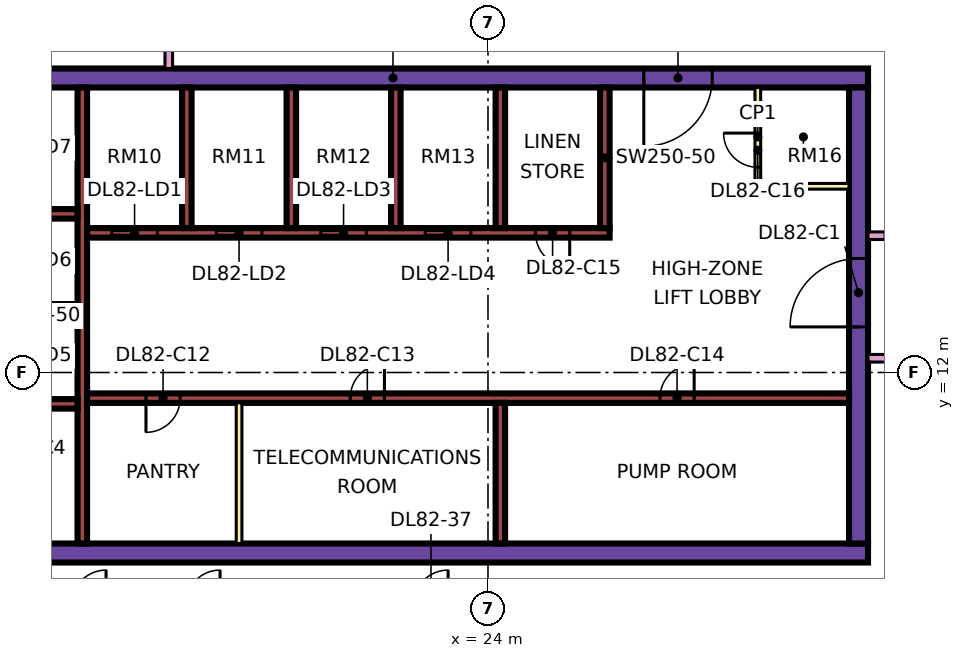
"""IFC4 building model, lengths in metres.
Left out: names, types, materials, properties, quantities, classifications, styles, units other than length and angle.
Written with IfcOpenShell. Run it as: python <this file> out.ifc"""

import sys

from ifc_helpers import new_model, si_unit, direction, frame, frame_2d, origin, place, context, subcontext, project, spatial, rectangle, extrude, element, fill, save


model = new_model("IFC4")
c1 = context("Model", 3, precision=1e-05, world=origin(), true_north=direction((0.0, 1.0)))
c2 = subcontext(c1, "Body", "Model", "MODEL_VIEW")
j1 = project(units=[si_unit("LENGTHUNIT", "METRE"), si_unit("PLANEANGLEUNIT", "RADIAN")], contexts=[c1])
p1 = place(None, origin())
s1 = spatial("IfcSite", under=j1, at=p1, CompositionType="ELEMENT")
p2 = place(p1, origin())
s2 = spatial("IfcBuilding", under=s1, at=p2, CompositionType="ELEMENT")
p3 = place(p2, frame((0.0, 0.0, 353.9)))
s3 = spatial("IfcBuildingStorey", under=s2, at=p3, CompositionType="ELEMENT", Elevation=353.9)
p4 = place(p3, frame((9.0, 7.25, 0.0), z_axis=(0.0, 0.0, 1.0), x_axis=(1.0, 0.0, 0.0)))
e1 = element("IfcWall", 1, at=p4, inside=s3, PredefinedType="SHEAR", context=c2, shape_type="SweptSolid", body=[
    extrude(rectangle(XDim=25.0, YDim=0.5, at=frame_2d((12.5, 0.0))), origin(), (0.0, 0.0, 1.0), 3.75),
])
p5 = place(p3, frame((9.0, 19.75, 0.0), z_axis=(0.0, 0.0, 1.0), x_axis=(1.0, 0.0, 0.0)))
e2 = element("IfcWall", 2, at=p5, inside=s3, PredefinedType="SHEAR", context=c2, shape_type="SweptSolid", body=[
    extrude(rectangle(XDim=25.0, YDim=0.5, at=frame_2d((12.5, 0.0))), origin(), (0.0, 0.0, 1.0), 3.75),
])
p6 = place(p5, frame((19.1, 0.0, 0.0)))
e3 = element("IfcOpeningElement", 3, at=p6, cuts=e2, PredefinedType="OPENING", context=c2, shape_type="SweptSolid", body=[
    extrude(rectangle(XDim=1.8, YDim=2.4, at=frame_2d((0.9, 1.2))), frame((0.0, 0.26, 0.0), z_axis=(0.0, -1.0, 0.0), x_axis=(1.0, 0.0, 0.0)), (0.0, 0.0, 1.0), 0.52),
])
p7 = place(p3, frame((33.75, 7.5, 0.0), z_axis=(0.0, 0.0, 1.0), x_axis=(0.0, 1.0, 0.0)))
e4 = element("IfcWall", 4, at=p7, inside=s3, PredefinedType="SHEAR", context=c2, shape_type="SweptSolid", body=[
    extrude(rectangle(XDim=12.0, YDim=0.5, at=frame_2d((6.0, 0.0))), origin(), (0.0, 0.0, 1.0), 3.75),
])
p8 = place(p7, frame((5.7, 0.0, 0.0)))
e5 = element("IfcOpeningElement", 5, at=p8, cuts=e4, PredefinedType="OPENING", context=c2, shape_type="SweptSolid", body=[
    extrude(rectangle(XDim=1.8, YDim=2.4, at=frame_2d((0.9, 1.2))), frame((0.0, 0.26, 0.0), z_axis=(0.0, -1.0, 0.0), x_axis=(1.0, 0.0, 0.0)), (0.0, 0.0, 1.0), 0.52),
])
p9 = place(p3, frame((13.325, 7.5, 0.0), z_axis=(0.0, 0.0, 1.0), x_axis=(0.0, 1.0, 0.0)))
e6 = element("IfcWall", 6, at=p9, inside=s3, PredefinedType="SHEAR", context=c2, shape_type="SweptSolid", body=[
    extrude(rectangle(XDim=12.0, YDim=0.25, at=frame_2d((6.0, 0.0))), origin(), (0.0, 0.0, 1.0), 3.75),
])
p10 = place(p3, frame((13.45, 11.325, 0.0), z_axis=(0.0, 0.0, 1.0), x_axis=(1.0, 0.0, 0.0)))
e7 = element("IfcWall", 7, at=p10, inside=s3, PredefinedType="SHEAR", context=c2, shape_type="SweptSolid", body=[
    extrude(rectangle(XDim=20.05, YDim=0.25, at=frame_2d((10.025, 0.0))), origin(), (0.0, 0.0, 1.0), 3.75),
])
p11 = place(p10, frame((1.55, 0.0, 0.0)))
e8 = element("IfcOpeningElement", 8, at=p11, cuts=e7, PredefinedType="OPENING", context=c2, shape_type="SweptSolid", body=[
    extrude(rectangle(XDim=0.9, YDim=2.1, at=frame_2d((0.45, 1.05))), frame((0.0, 0.135, 0.0), z_axis=(0.0, -1.0, 0.0), x_axis=(1.0, 0.0, 0.0)), (0.0, 0.0, 1.0), 0.27),
])
p12 = place(p10, frame((6.925, 0.0, 0.0)))
e9 = element("IfcOpeningElement", 9, at=p12, cuts=e7, PredefinedType="OPENING", context=c2, shape_type="SweptSolid", body=[
    extrude(rectangle(XDim=0.9, YDim=2.1, at=frame_2d((0.45, 1.05))), frame((0.0, 0.135, 0.0), z_axis=(0.0, -1.0, 0.0), x_axis=(1.0, 0.0, 0.0)), (0.0, 0.0, 1.0), 0.27),
])
p13 = place(p10, frame((15.075, 0.0, 0.0)))
e10 = element("IfcOpeningElement", 10, at=p13, cuts=e7, PredefinedType="OPENING", context=c2, shape_type="SweptSolid", body=[
    extrude(rectangle(XDim=0.9, YDim=2.1, at=frame_2d((0.45, 1.05))), frame((0.0, 0.135, 0.0), z_axis=(0.0, -1.0, 0.0), x_axis=(1.0, 0.0, 0.0)), (0.0, 0.0, 1.0), 0.27),
])
p14 = place(p3, frame((13.45, 15.675, 0.0), z_axis=(0.0, 0.0, 1.0), x_axis=(1.0, 0.0, 0.0)))
e11 = element("IfcWall", 11, at=p14, inside=s3, PredefinedType="SHEAR", context=c2, shape_type="SweptSolid", body=[
    extrude(rectangle(XDim=13.75, YDim=0.25, at=frame_2d((6.875, 0.0))), origin(), (0.0, 0.0, 1.0), 3.75),
])
p15 = place(p14, frame((0.65, 0.0, 0.0)))
e12 = element("IfcOpeningElement", 12, at=p15, cuts=e11, PredefinedType="OPENING", context=c2, shape_type="SweptSolid", body=[
    extrude(rectangle(XDim=1.2, YDim=2.2, at=frame_2d((0.6, 1.1))), frame((0.0, 0.135, 0.0), z_axis=(0.0, -1.0, 0.0), x_axis=(1.0, 0.0, 0.0)), (0.0, 0.0, 1.0), 0.27),
])
p16 = place(p14, frame((3.4, 0.0, 0.0)))
e13 = element("IfcOpeningElement", 13, at=p16, cuts=e11, PredefinedType="OPENING", context=c2, shape_type="SweptSolid", body=[
    extrude(rectangle(XDim=1.2, YDim=2.2, at=frame_2d((0.6, 1.1))), frame((0.0, 0.135, 0.0), z_axis=(0.0, -1.0, 0.0), x_axis=(1.0, 0.0, 0.0)), (0.0, 0.0, 1.0), 0.27),
])
p17 = place(p14, frame((6.15, 0.0, 0.0)))
e14 = element("IfcOpeningElement", 14, at=p17, cuts=e11, PredefinedType="OPENING", context=c2, shape_type="SweptSolid", body=[
    extrude(rectangle(XDim=1.2, YDim=2.2, at=frame_2d((0.6, 1.1))), frame((0.0, 0.135, 0.0), z_axis=(0.0, -1.0, 0.0), x_axis=(1.0, 0.0, 0.0)), (0.0, 0.0, 1.0), 0.27),
])
p18 = place(p14, frame((8.9, 0.0, 0.0)))
e15 = element("IfcOpeningElement", 15, at=p18, cuts=e11, PredefinedType="OPENING", context=c2, shape_type="SweptSolid", body=[
    extrude(rectangle(XDim=1.2, YDim=2.2, at=frame_2d((0.6, 1.1))), frame((0.0, 0.135, 0.0), z_axis=(0.0, -1.0, 0.0), x_axis=(1.0, 0.0, 0.0)), (0.0, 0.0, 1.0), 0.27),
])
p19 = place(p14, frame((11.8, 0.0, 0.0)))
e16 = element("IfcOpeningElement", 16, at=p19, cuts=e11, PredefinedType="OPENING", context=c2, shape_type="SweptSolid", body=[
    extrude(rectangle(XDim=0.9, YDim=2.1, at=frame_2d((0.45, 1.05))), frame((0.0, 0.135, 0.0), z_axis=(0.0, -1.0, 0.0), x_axis=(1.0, 0.0, 0.0)), (0.0, 0.0, 1.0), 0.27),
])
for number, where, z_axis, x_axis in (
    (17, (10.2, 11.175, 0.0), (0.0, 0.0, 1.0), (1.0, 0.0, 0.0)),
    (18, (10.2, 13.675, 0.0), (0.0, 0.0, 1.0), (1.0, 0.0, 0.0)),
    (19, (10.2, 16.175, 0.0), (0.0, 0.0, 1.0), (1.0, 0.0, 0.0)),
):
    element("IfcWall", number, at=place(p3, frame(where, z_axis=z_axis, x_axis=x_axis)), inside=s3, PredefinedType="SHEAR", context=c2, shape_type="SweptSolid", body=[
        extrude(rectangle(XDim=3.0, YDim=0.25, at=frame_2d((1.5, 0.0))), origin(), (0.0, 0.0, 1.0), 3.75),
    ])
for number, where, z_axis, x_axis in (
    (20, (24.325, 7.5, 0.0), (0.0, 0.0, 1.0), (0.0, 1.0, 0.0)),
    (21, (16.075, 15.8, 0.0), (0.0, 0.0, 1.0), (0.0, 1.0, 0.0)),
    (22, (18.825, 15.8, 0.0), (0.0, 0.0, 1.0), (0.0, 1.0, 0.0)),
    (23, (21.575, 15.8, 0.0), (0.0, 0.0, 1.0), (0.0, 1.0, 0.0)),
    (24, (24.325, 15.8, 0.0), (0.0, 0.0, 1.0), (0.0, 1.0, 0.0)),
    (25, (27.075, 15.8, 0.0), (0.0, 0.0, 1.0), (0.0, 1.0, 0.0)),
):
    element("IfcWall", number, at=place(p3, frame(where, z_axis=z_axis, x_axis=x_axis)), inside=s3, PredefinedType="SHEAR", context=c2, shape_type="SweptSolid", body=[
        extrude(rectangle(XDim=3.7, YDim=0.25, at=frame_2d((1.85, 0.0))), origin(), (0.0, 0.0, 1.0), 3.75),
    ])
p20 = place(p3, frame((-1.447, 12.553, 0.0), z_axis=(0.0, 0.0, 1.0), x_axis=(0.707106781187, -0.707106781187, 0.0)))
e26 = element("IfcWall", 26, at=p20, inside=s3, PredefinedType="SOLIDWALL", context=c2, shape_type="SweptSolid", body=[
    extrude(rectangle(XDim=19.799, YDim=0.15, at=frame_2d((9.899, 0.0))), origin(), (0.0, 0.0, 1.0), 3.35),
])
p21 = place(p20, frame((2.212, 0.0, 0.45)))
e27 = element("IfcOpeningElement", 27, at=p21, cuts=e26, PredefinedType="OPENING", context=c2, shape_type="SweptSolid", body=[
    extrude(rectangle(XDim=3.0, YDim=2.4, at=frame_2d((1.5, 1.2))), frame((0.0, 0.085, 0.0), z_axis=(0.0, -1.0, 0.0), x_axis=(1.0, 0.0, 0.0)), (0.0, 0.0, 1.0), 0.17),
])
p22 = place(p20, frame((10.216, 0.0, 0.45)))
e28 = element("IfcOpeningElement", 28, at=p22, cuts=e26, PredefinedType="OPENING", context=c2, shape_type="SweptSolid", body=[
    extrude(rectangle(XDim=3.0, YDim=2.4, at=frame_2d((1.5, 1.2))), frame((0.0, 0.085, 0.0), z_axis=(0.0, -1.0, 0.0), x_axis=(1.0, 0.0, 0.0)), (0.0, 0.0, 1.0), 0.17),
])
p23 = place(p3, frame((17.45, 7.5, 0.0), z_axis=(0.0, 0.0, 1.0), x_axis=(0.0, 1.0, 0.0)))
e29 = element("IfcWall", 29, at=p23, inside=s3, PredefinedType="PARTITIONING", context=c2, shape_type="SweptSolid", body=[
    extrude(rectangle(XDim=3.7, YDim=0.15, at=frame_2d((1.85, 0.0))), origin(), (0.0, 0.0, 1.0), 3.35),
])
p24 = place(p3, frame((31.1, 16.9, 0.0), z_axis=(0.0, 0.0, 1.0), x_axis=(0.0, 1.0, 0.0)))
e30 = element("IfcWall", 30, at=p24, inside=s3, PredefinedType="PARTITIONING", context=c2, shape_type="SweptSolid", body=[
    extrude(rectangle(XDim=2.6, YDim=0.15, at=frame_2d((1.3, 0.0))), origin(), (0.0, 0.0, 1.0), 3.35),
])
p25 = place(p24, frame((0.5, 0.0, 0.0)))
e31 = element("IfcOpeningElement", 31, at=p25, cuts=e30, PredefinedType="OPENING", context=c2, shape_type="SweptSolid", body=[
    extrude(rectangle(XDim=0.9, YDim=2.1, at=frame_2d((0.45, 1.05))), frame((0.0, 0.085, 0.0), z_axis=(0.0, -1.0, 0.0), x_axis=(1.0, 0.0, 0.0)), (0.0, 0.0, 1.0), 0.17),
])
p26 = place(p3, frame((31.1, 16.9, 0.0), z_axis=(0.0, 0.0, 1.0), x_axis=(1.0, 0.0, 0.0)))
e32 = element("IfcWall", 32, at=p26, inside=s3, PredefinedType="PARTITIONING", context=c2, shape_type="SweptSolid", body=[
    extrude(rectangle(XDim=2.4, YDim=0.15, at=frame_2d((1.2, 0.0))), origin(), (0.0, 0.0, 1.0), 3.35),
])
p27 = place(p3, frame((15.6, 20.0, 0.0), z_axis=(0.0, 0.0, 1.0), x_axis=(0.0, 1.0, 0.0)))
e33 = element("IfcWall", 33, at=p27, inside=s3, PredefinedType="PARTITIONING", context=c2, shape_type="SweptSolid", body=[
    extrude(rectangle(XDim=27.775, YDim=0.2, at=frame_2d((13.887, 0.0))), origin(), (0.0, 0.0, 1.0), 3.35),
])
p28 = place(p27, frame((5.95, 0.0, 0.0)))
e34 = element("IfcOpeningElement", 34, at=p28, cuts=e33, PredefinedType="OPENING", context=c2, shape_type="SweptSolid", body=[
    extrude(rectangle(XDim=1.0, YDim=2.1, at=frame_2d((0.5, 1.05))), frame((0.0, 0.11, 0.0), z_axis=(0.0, -1.0, 0.0), x_axis=(1.0, 0.0, 0.0)), (0.0, 0.0, 1.0), 0.22),
])
p29 = place(p27, frame((12.0, 0.0, 0.0)))
e35 = element("IfcOpeningElement", 35, at=p29, cuts=e33, PredefinedType="OPENING", context=c2, shape_type="SweptSolid", body=[
    extrude(rectangle(XDim=1.0, YDim=2.1, at=frame_2d((0.5, 1.05))), frame((0.0, 0.11, 0.0), z_axis=(0.0, -1.0, 0.0), x_axis=(1.0, 0.0, 0.0)), (0.0, 0.0, 1.0), 0.22),
])
p30 = place(p27, frame((16.75, 0.0, 0.0)))
e36 = element("IfcOpeningElement", 36, at=p30, cuts=e33, PredefinedType="OPENING", context=c2, shape_type="SweptSolid", body=[
    extrude(rectangle(XDim=1.0, YDim=2.1, at=frame_2d((0.5, 1.05))), frame((0.0, 0.11, 0.0), z_axis=(0.0, -1.0, 0.0), x_axis=(1.0, 0.0, 0.0)), (0.0, 0.0, 1.0), 0.22),
])
p31 = place(p27, frame((1.15, 0.0, 0.0)))
e37 = element("IfcOpeningElement", 37, at=p31, cuts=e33, PredefinedType="OPENING", context=c2, shape_type="SweptSolid", body=[
    extrude(rectangle(XDim=1.8, YDim=2.1, at=frame_2d((0.9, 1.05))), frame((0.0, 0.11, 0.0), z_axis=(0.0, -1.0, 0.0), x_axis=(1.0, 0.0, 0.0)), (0.0, 0.0, 1.0), 0.22),
])
p32 = place(p27, frame((25.9, 0.0, 0.0)))
e38 = element("IfcOpeningElement", 38, at=p32, cuts=e33, PredefinedType="OPENING", context=c2, shape_type="SweptSolid", body=[
    extrude(rectangle(XDim=1.0, YDim=2.1, at=frame_2d((0.5, 1.05))), frame((0.0, 0.11, 0.0), z_axis=(0.0, -1.0, 0.0), x_axis=(1.0, 0.0, 0.0)), (0.0, 0.0, 1.0), 0.22),
])
p33 = place(p3, frame((34.0, 12.375, 0.0), z_axis=(0.0, 0.0, 1.0), x_axis=(1.0, 0.0, 0.0)))
e39 = element("IfcWall", 39, at=p33, inside=s3, PredefinedType="PARTITIONING", context=c2, shape_type="SweptSolid", body=[
    extrude(rectangle(XDim=2.376, YDim=0.2, at=frame_2d((1.188, 0.0))), origin(), (0.0, 0.0, 1.0), 3.35),
])
p34 = place(p3, frame((34.0, 15.6, 0.0), z_axis=(0.0, 0.0, 1.0), x_axis=(1.0, 0.0, 0.0)))
e40 = element("IfcWall", 40, at=p34, inside=s3, PredefinedType="PARTITIONING", context=c2, shape_type="SweptSolid", body=[
    extrude(rectangle(XDim=10.35, YDim=0.2, at=frame_2d((5.175, 0.0))), origin(), (0.0, 0.0, 1.0), 3.35),
])
p35 = place(p34, frame((5.6, 0.0, 0.0)))
e41 = element("IfcOpeningElement", 41, at=p35, cuts=e40, PredefinedType="OPENING", context=c2, shape_type="SweptSolid", body=[
    extrude(rectangle(XDim=1.0, YDim=2.1, at=frame_2d((0.5, 1.05))), frame((0.0, 0.11, 0.0), z_axis=(0.0, -1.0, 0.0), x_axis=(1.0, 0.0, 0.0)), (0.0, 0.0, 1.0), 0.22),
])
p36 = place(p34, frame((0.45, 0.0, 0.0)))
e42 = element("IfcOpeningElement", 42, at=p36, cuts=e40, PredefinedType="OPENING", context=c2, shape_type="SweptSolid", body=[
    extrude(rectangle(XDim=1.2, YDim=2.1, at=frame_2d((0.6, 1.05))), frame((0.0, 0.11, 0.0), z_axis=(0.0, -1.0, 0.0), x_axis=(1.0, 0.0, 0.0)), (0.0, 0.0, 1.0), 0.22),
])
p37 = place(p15, origin())
e43 = element("IfcDoor", 43, at=p37, inside=s3, OperationType="DOUBLE_DOOR_SLIDING", PredefinedType="DOOR", context=c2, shape_type="SweptSolid", body=[
    extrude(rectangle(XDim=1.2, YDim=2.2, at=frame_2d((0.6, 1.1))), frame((0.0, 0.025, 0.0), z_axis=(0.0, -1.0, 0.0), x_axis=(1.0, 0.0, 0.0)), (0.0, 0.0, 1.0), 0.05),
])
fill(e12, e43)
p38 = place(p16, origin())
e44 = element("IfcDoor", 44, at=p38, inside=s3, OperationType="DOUBLE_DOOR_SLIDING", PredefinedType="DOOR", context=c2, shape_type="SweptSolid", body=[
    extrude(rectangle(XDim=1.2, YDim=2.2, at=frame_2d((0.6, 1.1))), frame((0.0, 0.025, 0.0), z_axis=(0.0, -1.0, 0.0), x_axis=(1.0, 0.0, 0.0)), (0.0, 0.0, 1.0), 0.05),
])
fill(e13, e44)
p39 = place(p17, origin())
e45 = element("IfcDoor", 45, at=p39, inside=s3, OperationType="DOUBLE_DOOR_SLIDING", PredefinedType="DOOR", context=c2, shape_type="SweptSolid", body=[
    extrude(rectangle(XDim=1.2, YDim=2.2, at=frame_2d((0.6, 1.1))), frame((0.0, 0.025, 0.0), z_axis=(0.0, -1.0, 0.0), x_axis=(1.0, 0.0, 0.0)), (0.0, 0.0, 1.0), 0.05),
])
fill(e14, e45)
p40 = place(p18, origin())
e46 = element("IfcDoor", 46, at=p40, inside=s3, OperationType="DOUBLE_DOOR_SLIDING", PredefinedType="DOOR", context=c2, shape_type="SweptSolid", body=[
    extrude(rectangle(XDim=1.2, YDim=2.2, at=frame_2d((0.6, 1.1))), frame((0.0, 0.025, 0.0), z_axis=(0.0, -1.0, 0.0), x_axis=(1.0, 0.0, 0.0)), (0.0, 0.0, 1.0), 0.05),
])
fill(e15, e46)
p41 = place(p8, origin())
e47 = element("IfcDoor", 47, at=p41, inside=s3, OperationType="DOUBLE_DOOR_SINGLE_SWING", PredefinedType="DOOR", context=c2, shape_type="SweptSolid", body=[
    extrude(rectangle(XDim=1.8, YDim=2.4, at=frame_2d((0.9, 1.2))), frame((0.0, 0.025, 0.0), z_axis=(0.0, -1.0, 0.0), x_axis=(1.0, 0.0, 0.0)), (0.0, 0.0, 1.0), 0.05),
])
fill(e5, e47)
p42 = place(p6, frame((1.8, 0.0, 0.0), z_axis=(0.0, 0.0, 1.0), x_axis=(-1.0, 0.0, 0.0)))
e48 = element("IfcDoor", 48, at=p42, inside=s3, OperationType="DOUBLE_DOOR_SINGLE_SWING", PredefinedType="DOOR", context=c2, shape_type="SweptSolid", body=[
    extrude(rectangle(XDim=1.8, YDim=2.4, at=frame_2d((0.9, 1.2))), frame((0.0, 0.025, 0.0), z_axis=(0.0, -1.0, 0.0), x_axis=(1.0, 0.0, 0.0)), (0.0, 0.0, 1.0), 0.05),
])
fill(e3, e48)
p43 = place(p11, frame((0.9, 0.0, 0.0), z_axis=(0.0, 0.0, 1.0), x_axis=(-1.0, 0.0, 0.0)))
e49 = element("IfcDoor", 49, at=p43, inside=s3, OperationType="SINGLE_SWING_LEFT", PredefinedType="DOOR", context=c2, shape_type="SweptSolid", body=[
    extrude(rectangle(XDim=0.9, YDim=2.1, at=frame_2d((0.45, 1.05))), frame((0.0, 0.025, 0.0), z_axis=(0.0, -1.0, 0.0), x_axis=(1.0, 0.0, 0.0)), (0.0, 0.0, 1.0), 0.05),
])
fill(e8, e49)
p44 = place(p12, frame((0.9, 0.0, 0.0), z_axis=(0.0, 0.0, 1.0), x_axis=(-1.0, 0.0, 0.0)))
e50 = element("IfcDoor", 50, at=p44, inside=s3, OperationType="SINGLE_SWING_RIGHT", PredefinedType="DOOR", context=c2, shape_type="SweptSolid", body=[
    extrude(rectangle(XDim=0.9, YDim=2.1, at=frame_2d((0.45, 1.05))), frame((0.0, 0.025, 0.0), z_axis=(0.0, -1.0, 0.0), x_axis=(1.0, 0.0, 0.0)), (0.0, 0.0, 1.0), 0.05),
])
fill(e9, e50)
p45 = place(p13, frame((0.9, 0.0, 0.0), z_axis=(0.0, 0.0, 1.0), x_axis=(-1.0, 0.0, 0.0)))
e51 = element("IfcDoor", 51, at=p45, inside=s3, OperationType="SINGLE_SWING_RIGHT", PredefinedType="DOOR", context=c2, shape_type="SweptSolid", body=[
    extrude(rectangle(XDim=0.9, YDim=2.1, at=frame_2d((0.45, 1.05))), frame((0.0, 0.025, 0.0), z_axis=(0.0, -1.0, 0.0), x_axis=(1.0, 0.0, 0.0)), (0.0, 0.0, 1.0), 0.05),
])
fill(e10, e51)
p46 = place(p19, origin())
e52 = element("IfcDoor", 52, at=p46, inside=s3, OperationType="SINGLE_SWING_RIGHT", PredefinedType="DOOR", context=c2, shape_type="SweptSolid", body=[
    extrude(rectangle(XDim=0.9, YDim=2.1, at=frame_2d((0.45, 1.05))), frame((0.0, 0.025, 0.0), z_axis=(0.0, -1.0, 0.0), x_axis=(1.0, 0.0, 0.0)), (0.0, 0.0, 1.0), 0.05),
])
fill(e16, e52)
p47 = place(p25, frame((0.9, 0.0, 0.0), z_axis=(0.0, 0.0, 1.0), x_axis=(-1.0, 0.0, 0.0)))
e53 = element("IfcDoor", 53, at=p47, inside=s3, OperationType="SINGLE_SWING_RIGHT", PredefinedType="DOOR", context=c2, shape_type="SweptSolid", body=[
    extrude(rectangle(XDim=0.9, YDim=2.1, at=frame_2d((0.45, 1.05))), frame((0.0, 0.025, 0.0), z_axis=(0.0, -1.0, 0.0), x_axis=(1.0, 0.0, 0.0)), (0.0, 0.0, 1.0), 0.05),
])
fill(e31, e53)
save(model, sys.argv[1])
